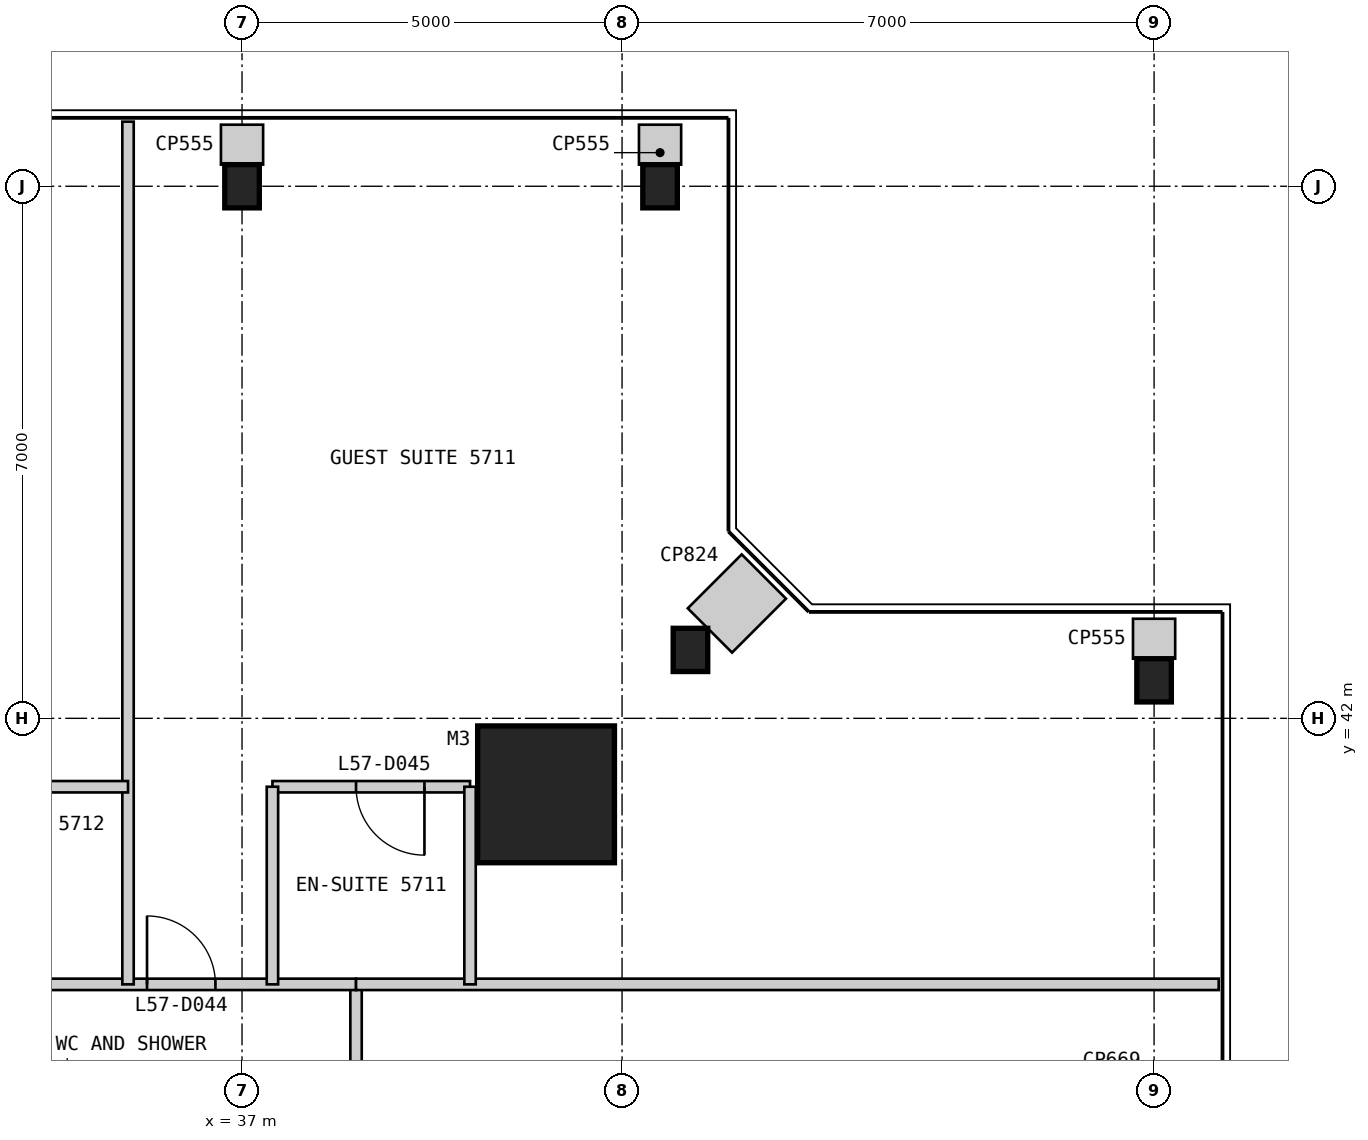
"""IFC4 building model, lengths in metres.
Left out: names, types, materials, properties, quantities, classifications, styles, units other than length and angle.
Written with IfcOpenShell. Run it as: python <this file> out.ifc"""

import sys

from ifc_helpers import new_model, si_unit, direction, frame, frame_2d, origin, origin_2d, place, context, subcontext, project, spatial, rectangle, i_section, extrude, element, fill, save


model = new_model("IFC4")
c1 = context("Model", 3, precision=1e-05, world=origin(), true_north=direction((0.0, 1.0)))
c2 = subcontext(c1, "Body", "Model", "MODEL_VIEW")
j1 = project(units=[si_unit("LENGTHUNIT", "METRE"), si_unit("PLANEANGLEUNIT", "RADIAN")], contexts=[c1])
p1 = place(None, origin())
s1 = spatial("IfcSite", under=j1, at=p1, CompositionType="ELEMENT")
p2 = place(p1, origin())
s2 = spatial("IfcBuilding", under=s1, at=p2, CompositionType="ELEMENT")
p3 = place(p2, frame((0.0, 0.0, 245.8)))
s3 = spatial("IfcBuildingStorey", under=s2, at=p3, CompositionType="ELEMENT", Elevation=245.8)
p4 = place(p3, frame((41.0, 41.0, 0.0), z_axis=(0.0, 0.0, 1.0), x_axis=(1.0, 0.0, 0.0)))
e1 = element("IfcColumn", 1, at=p4, inside=s3, PredefinedType="COLUMN", context=c2, shape_type="SweptSolid", body=[
    extrude(rectangle(XDim=1.8, YDim=1.8, at=origin_2d()), origin(), (0.0, 0.0, 1.0), 3.4),
])
for number, where, z_axis, x_axis in (
    (2, (49.0, 42.5, 0.0), (0.0, 0.0, 1.0), (1.0, 0.0, 0.0)),
    (3, (42.9, 42.9, 0.0), (0.0, 0.0, 1.0), (1.0, 0.0, 0.0)),
    (4, (42.5, 49.0, 0.0), (0.0, 0.0, 1.0), (1.0, 0.0, 0.0)),
    (5, (37.0, 49.0, 0.0), (0.0, 0.0, 1.0), (1.0, 0.0, 0.0)),
):
    element("IfcColumn", number, at=place(p3, frame(where, z_axis=z_axis, x_axis=x_axis)), inside=s3, PredefinedType="COLUMN", context=c2, shape_type="SweptSolid", body=[
        extrude(i_section(OverallWidth=0.455, OverallDepth=0.569, WebThickness=0.078, FlangeThickness=0.125, at=origin_2d()), origin(), (0.0, 0.0, 1.0), 3.4),
    ])
p5 = place(p3, frame((38.5, 11.5, 0.0), z_axis=(0.0, 0.0, 1.0), x_axis=(0.0, 1.0, 0.0)))
e6 = element("IfcWall", 6, at=p5, inside=s3, PredefinedType="PARTITIONING", context=c2, shape_type="SweptSolid", body=[
    extrude(rectangle(XDim=27.0, YDim=0.15, at=frame_2d((13.5, 0.0))), origin(), (0.0, 0.0, 1.0), 3.25),
])
p6 = place(p5, frame((1.85, 0.0, 0.0)))
e7 = element("IfcOpeningElement", 7, at=p6, cuts=e6, PredefinedType="OPENING", context=c2, shape_type="SweptSolid", body=[
    extrude(rectangle(XDim=0.9, YDim=2.1, at=frame_2d((0.45, 1.05))), frame((0.0, 0.085, 0.0), z_axis=(0.0, -1.0, 0.0), x_axis=(1.0, 0.0, 0.0)), (0.0, 0.0, 1.0), 0.17),
])
p7 = place(p5, frame((6.2, 0.0, 0.0)))
e8 = element("IfcOpeningElement", 8, at=p7, cuts=e6, PredefinedType="OPENING", context=c2, shape_type="SweptSolid", body=[
    extrude(rectangle(XDim=0.9, YDim=2.1, at=frame_2d((0.45, 1.05))), frame((0.0, 0.085, 0.0), z_axis=(0.0, -1.0, 0.0), x_axis=(1.0, 0.0, 0.0)), (0.0, 0.0, 1.0), 0.17),
])
p8 = place(p5, frame((12.2, 0.0, 0.0)))
e9 = element("IfcOpeningElement", 9, at=p8, cuts=e6, PredefinedType="OPENING", context=c2, shape_type="SweptSolid", body=[
    extrude(rectangle(XDim=0.9, YDim=2.1, at=frame_2d((0.45, 1.05))), frame((0.0, 0.085, 0.0), z_axis=(0.0, -1.0, 0.0), x_axis=(1.0, 0.0, 0.0)), (0.0, 0.0, 1.0), 0.17),
])
p9 = place(p5, frame((18.2, 0.0, 0.0)))
e10 = element("IfcOpeningElement", 10, at=p9, cuts=e6, PredefinedType="OPENING", context=c2, shape_type="SweptSolid", body=[
    extrude(rectangle(XDim=0.9, YDim=2.1, at=frame_2d((0.45, 1.05))), frame((0.0, 0.085, 0.0), z_axis=(0.0, -1.0, 0.0), x_axis=(1.0, 0.0, 0.0)), (0.0, 0.0, 1.0), 0.17),
])
p10 = place(p5, frame((24.2, 0.0, 0.0)))
e11 = element("IfcOpeningElement", 11, at=p10, cuts=e6, PredefinedType="OPENING", context=c2, shape_type="SweptSolid", body=[
    extrude(rectangle(XDim=0.9, YDim=2.1, at=frame_2d((0.45, 1.05))), frame((0.0, 0.085, 0.0), z_axis=(0.0, -1.0, 0.0), x_axis=(1.0, 0.0, 0.0)), (0.0, 0.0, 1.0), 0.17),
])
p11 = place(p3, frame((38.5, 38.5, 0.0), z_axis=(0.0, 0.0, 1.0), x_axis=(-1.0, 0.0, 0.0)))
e12 = element("IfcWall", 12, at=p11, inside=s3, PredefinedType="PARTITIONING", context=c2, shape_type="SweptSolid", body=[
    extrude(rectangle(XDim=27.0, YDim=0.15, at=frame_2d((13.5, 0.0))), origin(), (0.0, 0.0, 1.0), 3.25),
])
p12 = place(p11, frame((1.85, 0.0, 0.0)))
e13 = element("IfcOpeningElement", 13, at=p12, cuts=e12, PredefinedType="OPENING", context=c2, shape_type="SweptSolid", body=[
    extrude(rectangle(XDim=0.9, YDim=2.1, at=frame_2d((0.45, 1.05))), frame((0.0, 0.085, 0.0), z_axis=(0.0, -1.0, 0.0), x_axis=(1.0, 0.0, 0.0)), (0.0, 0.0, 1.0), 0.17),
])
p13 = place(p11, frame((6.2, 0.0, 0.0)))
e14 = element("IfcOpeningElement", 14, at=p13, cuts=e12, PredefinedType="OPENING", context=c2, shape_type="SweptSolid", body=[
    extrude(rectangle(XDim=0.9, YDim=2.1, at=frame_2d((0.45, 1.05))), frame((0.0, 0.085, 0.0), z_axis=(0.0, -1.0, 0.0), x_axis=(1.0, 0.0, 0.0)), (0.0, 0.0, 1.0), 0.17),
])
p14 = place(p11, frame((12.8, 0.0, 0.0)))
e15 = element("IfcOpeningElement", 15, at=p14, cuts=e12, PredefinedType="OPENING", context=c2, shape_type="SweptSolid", body=[
    extrude(rectangle(XDim=1.0, YDim=2.1, at=frame_2d((0.5, 1.05))), frame((0.0, 0.085, 0.0), z_axis=(0.0, -1.0, 0.0), x_axis=(1.0, 0.0, 0.0)), (0.0, 0.0, 1.0), 0.17),
])
p15 = place(p11, frame((18.2, 0.0, 0.0)))
e16 = element("IfcOpeningElement", 16, at=p15, cuts=e12, PredefinedType="OPENING", context=c2, shape_type="SweptSolid", body=[
    extrude(rectangle(XDim=0.9, YDim=2.1, at=frame_2d((0.45, 1.05))), frame((0.0, 0.085, 0.0), z_axis=(0.0, -1.0, 0.0), x_axis=(1.0, 0.0, 0.0)), (0.0, 0.0, 1.0), 0.17),
])
p16 = place(p11, frame((24.2, 0.0, 0.0)))
e17 = element("IfcOpeningElement", 17, at=p16, cuts=e12, PredefinedType="OPENING", context=c2, shape_type="SweptSolid", body=[
    extrude(rectangle(XDim=0.9, YDim=2.1, at=frame_2d((0.45, 1.05))), frame((0.0, 0.085, 0.0), z_axis=(0.0, -1.0, 0.0), x_axis=(1.0, 0.0, 0.0)), (0.0, 0.0, 1.0), 0.17),
])
p17 = place(p3, frame((49.85, 38.5, 0.0), z_axis=(0.0, 0.0, 1.0), x_axis=(-1.0, 0.0, 0.0)))
e18 = element("IfcWall", 18, at=p17, inside=s3, PredefinedType="PARTITIONING", context=c2, shape_type="SweptSolid", body=[
    extrude(rectangle(XDim=11.35, YDim=0.15, at=frame_2d((5.675, 0.0))), origin(), (0.0, 0.0, 1.0), 3.25),
])
p18 = place(p3, frame((40.0, 41.1, 0.0), z_axis=(0.0, 0.0, 1.0), x_axis=(-1.0, 0.0, 0.0)))
e19 = element("IfcWall", 19, at=p18, inside=s3, PredefinedType="PARTITIONING", context=c2, shape_type="SweptSolid", body=[
    extrude(rectangle(XDim=2.6, YDim=0.15, at=frame_2d((1.3, 0.0))), origin(), (0.0, 0.0, 1.0), 2.638),
])
p19 = place(p18, frame((0.6, 0.0, 0.0)))
e20 = element("IfcOpeningElement", 20, at=p19, cuts=e19, PredefinedType="OPENING", context=c2, shape_type="SweptSolid", body=[
    extrude(rectangle(XDim=0.9, YDim=2.1, at=frame_2d((0.45, 1.05))), frame((0.0, 0.085, 0.0), z_axis=(0.0, -1.0, 0.0), x_axis=(1.0, 0.0, 0.0)), (0.0, 0.0, 1.0), 0.17),
])
for number, where, z_axis, x_axis in (
    (21, (40.0, 41.1, 0.0), (0.0, 0.0, 1.0), (0.0, -1.0, 0.0)),
    (22, (37.4, 41.1, 0.0), (0.0, 0.0, 1.0), (0.0, -1.0, 0.0)),
):
    element("IfcWall", number, at=place(p3, frame(where, z_axis=z_axis, x_axis=x_axis)), inside=s3, PredefinedType="PARTITIONING", context=c2, shape_type="SweptSolid", body=[
        extrude(rectangle(XDim=2.6, YDim=0.15, at=frame_2d((1.3, 0.0))), origin(), (0.0, 0.0, 1.0), 3.25),
    ])
p20 = place(p3, frame((35.5, 49.85, 0.0), z_axis=(0.0, 0.0, 1.0), x_axis=(0.0, -1.0, 0.0)))
e23 = element("IfcWall", 23, at=p20, inside=s3, PredefinedType="PARTITIONING", context=c2, shape_type="SweptSolid", body=[
    extrude(rectangle(XDim=11.35, YDim=0.15, at=frame_2d((5.675, 0.0))), origin(), (0.0, 0.0, 1.0), 3.25),
])
p21 = place(p3, frame((35.5, 41.1, 0.0), z_axis=(0.0, 0.0, 1.0), x_axis=(-1.0, 0.0, 0.0)))
e24 = element("IfcWall", 24, at=p21, inside=s3, PredefinedType="PARTITIONING", context=c2, shape_type="SweptSolid", body=[
    extrude(rectangle(XDim=2.6, YDim=0.15, at=frame_2d((1.3, 0.0))), origin(), (0.0, 0.0, 1.0), 3.25),
])
p22 = place(p3, frame((49.0, 43.31, 0.0), z_axis=(0.0, 0.0, 1.0), x_axis=(0.0, -1.0, 0.0)))
e25 = element("IfcWall", 25, at=p22, inside=s3, PredefinedType="PARTITIONING", context=c2, shape_type="SweptSolid", body=[
    extrude(rectangle(XDim=0.526, YDim=0.555, at=frame_2d((0.263, 0.0))), origin(), (0.0, 0.0, 1.0), 3.25),
])
p23 = place(p3, frame((43.866, 43.866, 0.0), z_axis=(0.0, 0.0, 1.0), x_axis=(-0.707106781187, -0.707106781187, 0.0)))
e26 = element("IfcWall", 26, at=p23, inside=s3, PredefinedType="PARTITIONING", context=c2, shape_type="SweptSolid", body=[
    extrude(rectangle(XDim=1.004, YDim=0.824, at=frame_2d((0.502, 0.0))), origin(), (0.0, 0.0, 1.0), 3.25),
])
for number, where, z_axis, x_axis in (
    (27, (42.5, 49.81, 0.0), (0.0, 0.0, 1.0), (0.0, -1.0, 0.0)),
    (28, (37.0, 49.81, 0.0), (0.0, 0.0, 1.0), (0.0, -1.0, 0.0)),
):
    element("IfcWall", number, at=place(p3, frame(where, z_axis=z_axis, x_axis=x_axis)), inside=s3, PredefinedType="PARTITIONING", context=c2, shape_type="SweptSolid", body=[
        extrude(rectangle(XDim=0.526, YDim=0.555, at=frame_2d((0.263, 0.0))), origin(), (0.0, 0.0, 1.0), 3.25),
    ])
p24 = place(p12, frame((0.9, 0.0, 0.0), z_axis=(0.0, 0.0, 1.0), x_axis=(-1.0, 0.0, 0.0)))
e29 = element("IfcDoor", 29, at=p24, inside=s3, OperationType="SINGLE_SWING_LEFT", PredefinedType="DOOR", context=c2, shape_type="SweptSolid", body=[
    extrude(rectangle(XDim=0.9, YDim=2.1, at=frame_2d((0.45, 1.05))), frame((0.0, 0.025, 0.0), z_axis=(0.0, -1.0, 0.0), x_axis=(1.0, 0.0, 0.0)), (0.0, 0.0, 1.0), 0.05),
])
fill(e13, e29)
p25 = place(p19, origin())
e30 = element("IfcDoor", 30, at=p25, inside=s3, OperationType="SINGLE_SWING_LEFT", PredefinedType="DOOR", context=c2, shape_type="SweptSolid", body=[
    extrude(rectangle(XDim=0.9, YDim=2.1, at=frame_2d((0.45, 1.05))), frame((0.0, 0.025, 0.0), z_axis=(0.0, -1.0, 0.0), x_axis=(1.0, 0.0, 0.0)), (0.0, 0.0, 1.0), 0.05),
])
fill(e20, e30)
save(model, sys.argv[1])
